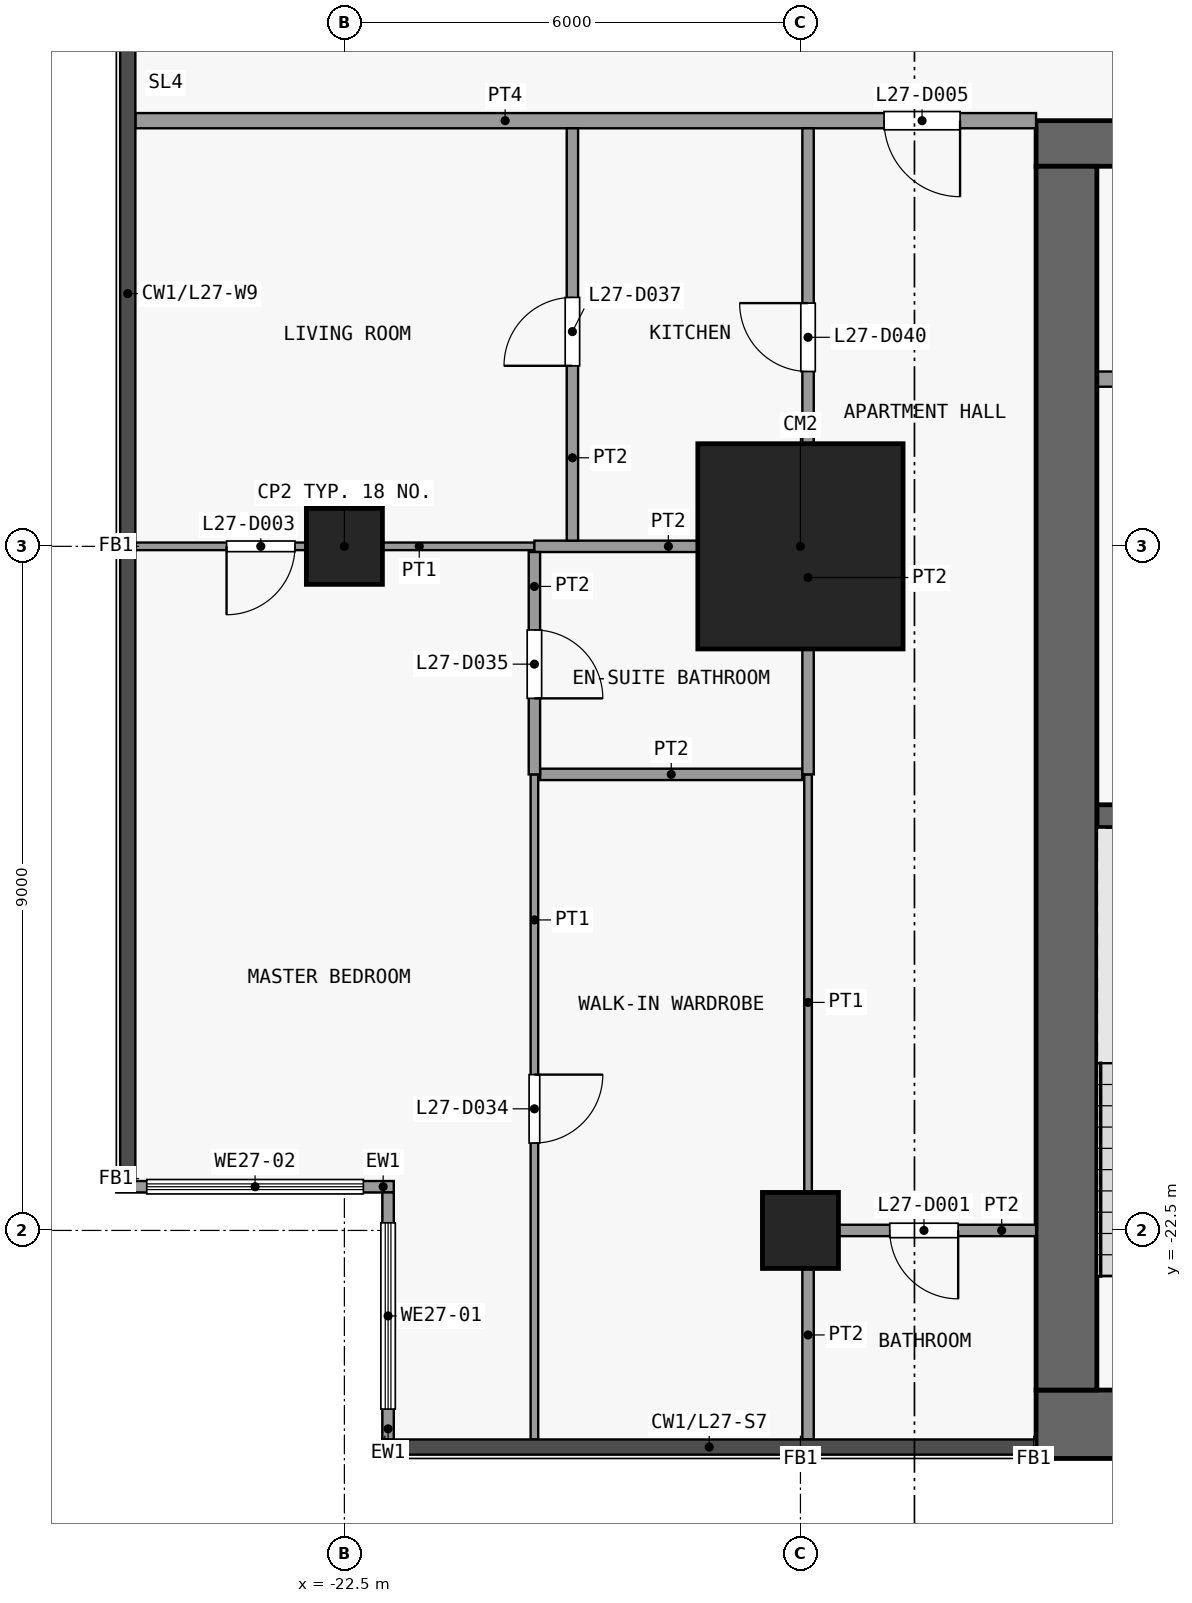
"""IFC4 building model, lengths in metres.
Left out: names, types, materials, properties, quantities, classifications, styles, units other than length and angle.
Written with IfcOpenShell. Run it as: python <this file> out.ifc"""

import sys

from ifc_helpers import new_model, si_unit, direction, frame, frame_2d, origin, origin_2d, place, context, subcontext, project, spatial, rectangle, extrude, element, fill, save


model = new_model("IFC4")
c1 = context("Model", 3, precision=1e-05, world=origin(), true_north=direction((0.0, 1.0)))
c2 = subcontext(c1, "Body", "Model", "MODEL_VIEW")
j1 = project(units=[si_unit("LENGTHUNIT", "METRE"), si_unit("PLANEANGLEUNIT", "RADIAN")], contexts=[c1])
p1 = place(None, origin())
s1 = spatial("IfcSite", under=j1, at=p1, CompositionType="ELEMENT")
p2 = place(p1, origin())
s2 = spatial("IfcBuilding", under=s1, at=p2, CompositionType="ELEMENT")
p3 = place(p2, frame((0.0, 0.0, 109.9)))
s3 = spatial("IfcBuildingStorey", under=s2, at=p3, CompositionType="ELEMENT", Elevation=109.9)
for number, where, z_axis, x_axis in (
    (1, (-22.5, -13.5, 0.0), (0.0, 0.0, 1.0), (1.0, 0.0, 0.0)),
    (2, (-16.5, -22.5, 0.0), (0.0, 0.0, 1.0), (1.0, 0.0, 0.0)),
):
    element("IfcColumn", number, at=place(p3, frame(where, z_axis=z_axis, x_axis=x_axis)), inside=s3, PredefinedType="COLUMN", context=c2, shape_type="SweptSolid", body=[
        extrude(rectangle(XDim=1.0, YDim=1.0, at=origin_2d()), origin(), (0.0, 0.0, 1.0), 3.6),
    ])
p4 = place(p3, frame((-16.5, -13.5, 0.0), z_axis=(0.0, 0.0, 1.0), x_axis=(1.0, 0.0, 0.0)))
e3 = element("IfcColumn", 3, at=p4, inside=s3, PredefinedType="COLUMN", context=c2, shape_type="SweptSolid", body=[
    extrude(rectangle(XDim=2.7, YDim=2.7, at=origin_2d()), origin(), (0.0, 0.0, 1.0), 3.6),
])
p5 = place(p3, frame((-13.4, -25.05, 0.0), z_axis=(0.0, 0.0, 1.0), x_axis=(1.0, 0.0, 0.0)))
e4 = element("IfcWall", 4, at=p5, inside=s3, PredefinedType="SHEAR", context=c2, shape_type="SweptSolid", body=[
    extrude(rectangle(XDim=26.8, YDim=0.9, at=frame_2d((13.4, 0.0))), origin(), (0.0, 0.0, 1.0), 3.3),
])
p6 = place(p3, frame((-13.4, -8.2, 0.0), z_axis=(0.0, 0.0, 1.0), x_axis=(1.0, 0.0, 0.0)))
e5 = element("IfcWall", 5, at=p6, inside=s3, PredefinedType="SHEAR", context=c2, shape_type="SweptSolid", body=[
    extrude(rectangle(XDim=26.8, YDim=0.6, at=frame_2d((13.4, 0.0))), origin(), (0.0, 0.0, 1.0), 3.3),
])
p7 = place(p6, frame((7.7, 0.0, 0.0)))
e6 = element("IfcOpeningElement", 6, at=p7, cuts=e5, PredefinedType="OPENING", context=c2, shape_type="SweptSolid", body=[
    extrude(rectangle(XDim=1.8, YDim=2.1, at=frame_2d((0.9, 1.05))), frame((0.0, 0.31, 0.0), z_axis=(0.0, -1.0, 0.0), x_axis=(1.0, 0.0, 0.0)), (0.0, 0.0, 1.0), 0.62),
])
p8 = place(p6, frame((17.3, 0.0, 0.0)))
e7 = element("IfcOpeningElement", 7, at=p8, cuts=e5, PredefinedType="OPENING", context=c2, shape_type="SweptSolid", body=[
    extrude(rectangle(XDim=1.8, YDim=2.1, at=frame_2d((0.9, 1.05))), frame((0.0, 0.31, 0.0), z_axis=(0.0, -1.0, 0.0), x_axis=(1.0, 0.0, 0.0)), (0.0, 0.0, 1.0), 0.62),
])
p9 = place(p6, frame((2.625, 0.0, 0.0)))
e8 = element("IfcOpeningElement", 8, at=p9, cuts=e5, PredefinedType="OPENING", context=c2, shape_type="SweptSolid", body=[
    extrude(rectangle(XDim=0.9, YDim=2.1, at=frame_2d((0.45, 1.05))), frame((0.0, 0.31, 0.0), z_axis=(0.0, -1.0, 0.0), x_axis=(1.0, 0.0, 0.0)), (0.0, 0.0, 1.0), 0.62),
])
p10 = place(p6, frame((23.275, 0.0, 0.0)))
e9 = element("IfcOpeningElement", 9, at=p10, cuts=e5, PredefinedType="OPENING", context=c2, shape_type="SweptSolid", body=[
    extrude(rectangle(XDim=0.9, YDim=2.1, at=frame_2d((0.45, 1.05))), frame((0.0, 0.31, 0.0), z_axis=(0.0, -1.0, 0.0), x_axis=(1.0, 0.0, 0.0)), (0.0, 0.0, 1.0), 0.62),
])
p11 = place(p3, frame((-13.0, -24.6, 0.0), z_axis=(0.0, 0.0, 1.0), x_axis=(0.0, 1.0, 0.0)))
e10 = element("IfcWall", 10, at=p11, inside=s3, PredefinedType="SHEAR", context=c2, shape_type="SweptSolid", body=[
    extrude(rectangle(XDim=16.1, YDim=0.8, at=frame_2d((8.05, 0.0))), origin(), (0.0, 0.0, 1.0), 3.3),
])
p12 = place(p3, frame((-12.6, -17.05, 0.0), z_axis=(0.0, 0.0, 1.0), x_axis=(1.0, 0.0, 0.0)))
e11 = element("IfcWall", 11, at=p12, inside=s3, PredefinedType="SHEAR", context=c2, shape_type="SweptSolid", body=[
    extrude(rectangle(XDim=2.85, YDim=0.3, at=frame_2d((1.425, 0.0))), origin(), (0.0, 0.0, 1.0), 3.3),
])
p13 = place(p3, frame((-12.6, -11.3, 0.0), z_axis=(0.0, 0.0, 1.0), x_axis=(1.0, 0.0, 0.0)))
e12 = element("IfcWall", 12, at=p13, inside=s3, PredefinedType="PARTITIONING", context=c2, shape_type="SweptSolid", body=[
    extrude(rectangle(XDim=1.45, YDim=0.2, at=frame_2d((0.725, 0.0))), origin(), (0.0, 0.0, 1.0), 3.3),
])
p14 = place(p3, frame((-21.925, -25.25, 0.0), z_axis=(0.0, 0.0, 1.0), x_axis=(0.0, 1.0, 0.0)))
e13 = element("IfcWall", 13, at=p14, inside=s3, PredefinedType="SOLIDWALL", context=c2, shape_type="SweptSolid", body=[
    extrude(rectangle(XDim=3.25, YDim=0.15, at=frame_2d((1.625, 0.0))), origin(), (0.0, 0.0, 1.0), 3.3),
])
p15 = place(p14, frame((0.4, 0.0, 0.9)))
e14 = element("IfcOpeningElement", 14, at=p15, cuts=e13, PredefinedType="OPENING", context=c2, shape_type="SweptSolid", body=[
    extrude(rectangle(XDim=2.45, YDim=2.4, at=frame_2d((1.225, 1.2))), frame((0.0, 0.085, 0.0), z_axis=(0.0, -1.0, 0.0), x_axis=(1.0, 0.0, 0.0)), (0.0, 0.0, 1.0), 0.17),
])
p16 = place(p3, frame((-21.85, -21.925, 0.0), z_axis=(0.0, 0.0, 1.0), x_axis=(-1.0, 0.0, 0.0)))
e15 = element("IfcWall", 15, at=p16, inside=s3, PredefinedType="SOLIDWALL", context=c2, shape_type="SweptSolid", body=[
    extrude(rectangle(XDim=3.65, YDim=0.15, at=frame_2d((1.825, 0.0))), origin(), (0.0, 0.0, 1.0), 3.3),
])
p17 = place(p16, frame((0.4, 0.0, 0.9)))
e16 = element("IfcOpeningElement", 16, at=p17, cuts=e15, PredefinedType="OPENING", context=c2, shape_type="SweptSolid", body=[
    extrude(rectangle(XDim=2.85, YDim=2.4, at=frame_2d((1.425, 1.2))), frame((0.0, 0.085, 0.0), z_axis=(0.0, -1.0, 0.0), x_axis=(1.0, 0.0, 0.0)), (0.0, 0.0, 1.0), 0.17),
])
p18 = place(p3, frame((-16.325, -22.5, 0.0), z_axis=(0.0, 0.0, 1.0), x_axis=(1.0, 0.0, 0.0)))
e17 = element("IfcWall", 17, at=p18, inside=s3, PredefinedType="PARTITIONING", context=c2, shape_type="SweptSolid", body=[
    extrude(rectangle(XDim=2.925, YDim=0.15, at=frame_2d((1.462, 0.0))), origin(), (0.0, 0.0, 1.0), 3.3),
])
p19 = place(p18, frame((1.0, 0.0, 0.0)))
e18 = element("IfcOpeningElement", 18, at=p19, cuts=e17, PredefinedType="OPENING", context=c2, shape_type="SweptSolid", body=[
    extrude(rectangle(XDim=0.9, YDim=2.1, at=frame_2d((0.45, 1.05))), frame((0.0, 0.085, 0.0), z_axis=(0.0, -1.0, 0.0), x_axis=(1.0, 0.0, 0.0)), (0.0, 0.0, 1.0), 0.17),
])
p20 = place(p3, frame((-19.925, -16.5, 0.0), z_axis=(0.0, 0.0, 1.0), x_axis=(1.0, 0.0, 0.0)))
e19 = element("IfcWall", 19, at=p20, inside=s3, PredefinedType="PARTITIONING", context=c2, shape_type="SweptSolid", body=[
    extrude(rectangle(XDim=3.45, YDim=0.15, at=frame_2d((1.725, 0.0))), origin(), (0.0, 0.0, 1.0), 3.3),
])
p21 = place(p3, frame((-25.25, -13.5, 0.0), z_axis=(0.0, 0.0, 1.0), x_axis=(1.0, 0.0, 0.0)))
e20 = element("IfcWall", 20, at=p21, inside=s3, PredefinedType="PARTITIONING", context=c2, shape_type="SweptSolid", body=[
    extrude(rectangle(XDim=5.25, YDim=0.1, at=frame_2d((2.625, 0.0))), origin(), (0.0, 0.0, 1.0), 3.3),
])
p22 = place(p21, frame((1.2, 0.0, 0.0)))
e21 = element("IfcOpeningElement", 21, at=p22, cuts=e20, PredefinedType="OPENING", context=c2, shape_type="SweptSolid", body=[
    extrude(rectangle(XDim=0.9, YDim=2.1, at=frame_2d((0.45, 1.05))), frame((0.0, 0.06, 0.0), z_axis=(0.0, -1.0, 0.0), x_axis=(1.0, 0.0, 0.0)), (0.0, 0.0, 1.0), 0.12),
])
p23 = place(p3, frame((-20.0, -13.5, 0.0), z_axis=(0.0, 0.0, 1.0), x_axis=(1.0, 0.0, 0.0)))
e22 = element("IfcWall", 22, at=p23, inside=s3, PredefinedType="PARTITIONING", context=c2, shape_type="SweptSolid", body=[
    extrude(rectangle(XDim=3.525, YDim=0.15, at=frame_2d((1.762, 0.0))), origin(), (0.0, 0.0, 1.0), 3.3),
])
p24 = place(p3, frame((-25.25, -7.9, 0.0), z_axis=(0.0, 0.0, 1.0), x_axis=(1.0, 0.0, 0.0)))
e23 = element("IfcWall", 23, at=p24, inside=s3, PredefinedType="PARTITIONING", context=c2, shape_type="SweptSolid", body=[
    extrude(rectangle(XDim=11.85, YDim=0.2, at=frame_2d((5.925, 0.0))), origin(), (0.0, 0.0, 1.0), 3.3),
])
p25 = place(p24, frame((9.85, 0.0, 0.0)))
e24 = element("IfcOpeningElement", 24, at=p25, cuts=e23, PredefinedType="OPENING", context=c2, shape_type="SweptSolid", body=[
    extrude(rectangle(XDim=1.0, YDim=2.1, at=frame_2d((0.5, 1.05))), frame((0.0, 0.11, 0.0), z_axis=(0.0, -1.0, 0.0), x_axis=(1.0, 0.0, 0.0)), (0.0, 0.0, 1.0), 0.22),
])
p26 = place(p3, frame((-20.0, -25.25, 0.0), z_axis=(0.0, 0.0, 1.0), x_axis=(0.0, 1.0, 0.0)))
e25 = element("IfcWall", 25, at=p26, inside=s3, PredefinedType="PARTITIONING", context=c2, shape_type="SweptSolid", body=[
    extrude(rectangle(XDim=8.75, YDim=0.1, at=frame_2d((4.375, 0.0))), origin(), (0.0, 0.0, 1.0), 3.3),
])
p27 = place(p26, frame((3.9, 0.0, 0.0)))
e26 = element("IfcOpeningElement", 26, at=p27, cuts=e25, PredefinedType="OPENING", context=c2, shape_type="SweptSolid", body=[
    extrude(rectangle(XDim=0.9, YDim=2.1, at=frame_2d((0.45, 1.05))), frame((0.0, 0.06, 0.0), z_axis=(0.0, -1.0, 0.0), x_axis=(1.0, 0.0, 0.0)), (0.0, 0.0, 1.0), 0.12),
])
p28 = place(p3, frame((-20.0, -16.5, 0.0), z_axis=(0.0, 0.0, 1.0), x_axis=(0.0, 1.0, 0.0)))
e27 = element("IfcWall", 27, at=p28, inside=s3, PredefinedType="PARTITIONING", context=c2, shape_type="SweptSolid", body=[
    extrude(rectangle(XDim=2.925, YDim=0.15, at=frame_2d((1.462, 0.0))), origin(), (0.0, 0.0, 1.0), 3.3),
])
p29 = place(p28, frame((1.0, 0.0, 0.0)))
e28 = element("IfcOpeningElement", 28, at=p29, cuts=e27, PredefinedType="OPENING", context=c2, shape_type="SweptSolid", body=[
    extrude(rectangle(XDim=0.9, YDim=2.1, at=frame_2d((0.45, 1.05))), frame((0.0, 0.085, 0.0), z_axis=(0.0, -1.0, 0.0), x_axis=(1.0, 0.0, 0.0)), (0.0, 0.0, 1.0), 0.17),
])
p30 = place(p3, frame((-19.5, -13.425, 0.0), z_axis=(0.0, 0.0, 1.0), x_axis=(0.0, 1.0, 0.0)))
e29 = element("IfcWall", 29, at=p30, inside=s3, PredefinedType="PARTITIONING", context=c2, shape_type="SweptSolid", body=[
    extrude(rectangle(XDim=5.425, YDim=0.15, at=frame_2d((2.712, 0.0))), origin(), (0.0, 0.0, 1.0), 3.3),
])
p31 = place(p30, frame((2.3, 0.0, 0.0)))
e30 = element("IfcOpeningElement", 30, at=p31, cuts=e29, PredefinedType="OPENING", context=c2, shape_type="SweptSolid", body=[
    extrude(rectangle(XDim=0.9, YDim=2.1, at=frame_2d((0.45, 1.05))), frame((0.0, 0.085, 0.0), z_axis=(0.0, -1.0, 0.0), x_axis=(1.0, 0.0, 0.0)), (0.0, 0.0, 1.0), 0.17),
])
p32 = place(p3, frame((-16.4, -22.5, 0.0), z_axis=(0.0, 0.0, 1.0), x_axis=(0.0, 1.0, 0.0)))
e31 = element("IfcWall", 31, at=p32, inside=s3, PredefinedType="PARTITIONING", context=c2, shape_type="SweptSolid", body=[
    extrude(rectangle(XDim=6.0, YDim=0.1, at=frame_2d((3.0, 0.0))), origin(), (0.0, 0.0, 1.0), 3.3),
])
p33 = place(p3, frame((-16.4, -25.25, 0.0), z_axis=(0.0, 0.0, 1.0), x_axis=(0.0, 1.0, 0.0)))
e32 = element("IfcWall", 32, at=p33, inside=s3, PredefinedType="PARTITIONING", context=c2, shape_type="SweptSolid", body=[
    extrude(rectangle(XDim=2.75, YDim=0.15, at=frame_2d((1.375, 0.0))), origin(), (0.0, 0.0, 1.0), 3.3),
])
p34 = place(p3, frame((-16.4, -16.5, 0.0), z_axis=(0.0, 0.0, 1.0), x_axis=(0.0, 1.0, 0.0)))
e33 = element("IfcWall", 33, at=p34, inside=s3, PredefinedType="PARTITIONING", context=c2, shape_type="SweptSolid", body=[
    extrude(rectangle(XDim=8.5, YDim=0.15, at=frame_2d((4.25, 0.0))), origin(), (0.0, 0.0, 1.0), 3.3),
])
p35 = place(p34, frame((5.3, 0.0, 0.0)))
e34 = element("IfcOpeningElement", 34, at=p35, cuts=e33, PredefinedType="OPENING", context=c2, shape_type="SweptSolid", body=[
    extrude(rectangle(XDim=0.9, YDim=2.1, at=frame_2d((0.45, 1.05))), frame((0.0, 0.085, 0.0), z_axis=(0.0, -1.0, 0.0), x_axis=(1.0, 0.0, 0.0)), (0.0, 0.0, 1.0), 0.17),
])
p36 = place(p15, origin())
e35 = element("IfcWindow", 35, at=p36, inside=s3, PartitioningType="SINGLE_PANEL", PredefinedType="WINDOW", context=c2, shape_type="SweptSolid", body=[
    extrude(rectangle(XDim=2.45, YDim=2.4, at=frame_2d((1.225, 1.2))), frame((0.0, 0.03, 0.0), z_axis=(0.0, -1.0, 0.0), x_axis=(1.0, 0.0, 0.0)), (0.0, 0.0, 1.0), 0.06),
])
fill(e14, e35)
p37 = place(p17, origin())
e36 = element("IfcWindow", 36, at=p37, inside=s3, PartitioningType="SINGLE_PANEL", PredefinedType="WINDOW", context=c2, shape_type="SweptSolid", body=[
    extrude(rectangle(XDim=2.85, YDim=2.4, at=frame_2d((1.425, 1.2))), frame((0.0, 0.03, 0.0), z_axis=(0.0, -1.0, 0.0), x_axis=(1.0, 0.0, 0.0)), (0.0, 0.0, 1.0), 0.06),
])
fill(e16, e36)
p38 = place(p19, origin())
e37 = element("IfcDoor", 37, at=p38, inside=s3, OperationType="SINGLE_SWING_RIGHT", PredefinedType="DOOR", context=c2, shape_type="SweptSolid", body=[
    extrude(rectangle(XDim=0.9, YDim=2.1, at=frame_2d((0.45, 1.05))), frame((0.0, 0.025, 0.0), z_axis=(0.0, -1.0, 0.0), x_axis=(1.0, 0.0, 0.0)), (0.0, 0.0, 1.0), 0.05),
])
fill(e18, e37)
p39 = place(p22, origin())
e38 = element("IfcDoor", 38, at=p39, inside=s3, OperationType="SINGLE_SWING_LEFT", PredefinedType="DOOR", context=c2, shape_type="SweptSolid", body=[
    extrude(rectangle(XDim=0.9, YDim=2.1, at=frame_2d((0.45, 1.05))), frame((0.0, 0.025, 0.0), z_axis=(0.0, -1.0, 0.0), x_axis=(1.0, 0.0, 0.0)), (0.0, 0.0, 1.0), 0.05),
])
fill(e21, e38)
p40 = place(p25, origin())
e39 = element("IfcDoor", 39, at=p40, inside=s3, OperationType="SINGLE_SWING_RIGHT", PredefinedType="DOOR", context=c2, shape_type="SweptSolid", body=[
    extrude(rectangle(XDim=1.0, YDim=2.1, at=frame_2d((0.5, 1.05))), frame((0.0, 0.025, 0.0), z_axis=(0.0, -1.0, 0.0), x_axis=(1.0, 0.0, 0.0)), (0.0, 0.0, 1.0), 0.05),
])
fill(e24, e39)
p41 = place(p27, origin())
e40 = element("IfcDoor", 40, at=p41, inside=s3, OperationType="SINGLE_SWING_RIGHT", PredefinedType="DOOR", context=c2, shape_type="SweptSolid", body=[
    extrude(rectangle(XDim=0.9, YDim=2.1, at=frame_2d((0.45, 1.05))), frame((0.0, 0.025, 0.0), z_axis=(0.0, -1.0, 0.0), x_axis=(1.0, 0.0, 0.0)), (0.0, 0.0, 1.0), 0.05),
])
fill(e26, e40)
p42 = place(p29, origin())
e41 = element("IfcDoor", 41, at=p42, inside=s3, OperationType="SINGLE_SWING_LEFT", PredefinedType="DOOR", context=c2, shape_type="SweptSolid", body=[
    extrude(rectangle(XDim=0.9, YDim=2.1, at=frame_2d((0.45, 1.05))), frame((0.0, 0.025, 0.0), z_axis=(0.0, -1.0, 0.0), x_axis=(1.0, 0.0, 0.0)), (0.0, 0.0, 1.0), 0.05),
])
fill(e28, e41)
p43 = place(p31, origin())
e42 = element("IfcDoor", 42, at=p43, inside=s3, OperationType="SINGLE_SWING_RIGHT", PredefinedType="DOOR", context=c2, shape_type="SweptSolid", body=[
    extrude(rectangle(XDim=0.9, YDim=2.1, at=frame_2d((0.45, 1.05))), frame((0.0, 0.025, 0.0), z_axis=(0.0, -1.0, 0.0), x_axis=(1.0, 0.0, 0.0)), (0.0, 0.0, 1.0), 0.05),
])
fill(e30, e42)
p44 = place(p35, origin())
e43 = element("IfcDoor", 43, at=p44, inside=s3, OperationType="SINGLE_SWING_LEFT", PredefinedType="DOOR", context=c2, shape_type="SweptSolid", body=[
    extrude(rectangle(XDim=0.9, YDim=2.1, at=frame_2d((0.45, 1.05))), frame((0.0, 0.025, 0.0), z_axis=(0.0, -1.0, 0.0), x_axis=(1.0, 0.0, 0.0)), (0.0, 0.0, 1.0), 0.05),
])
fill(e34, e43)
save(model, sys.argv[1])
